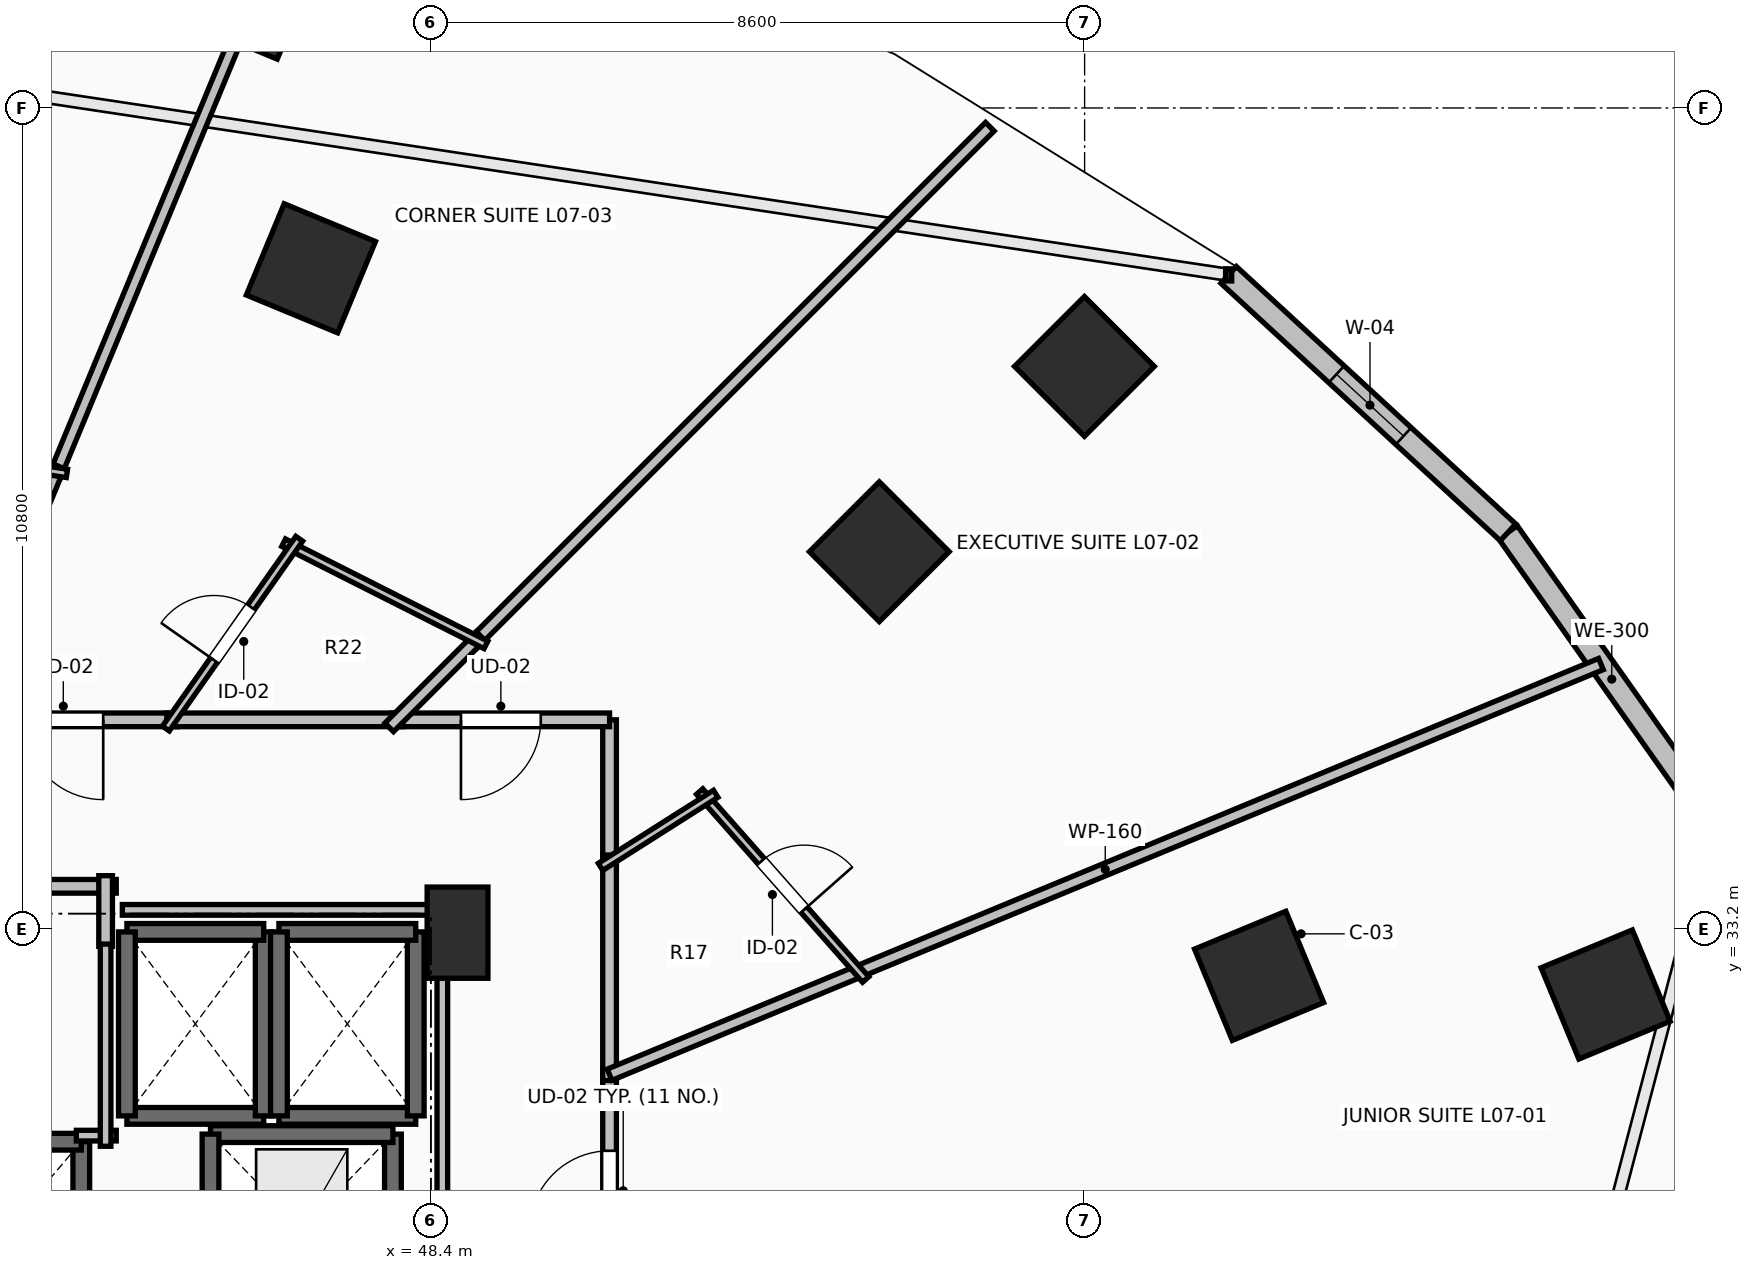
"""IFC4 building model, lengths in metres.
Left out: names, types, materials, properties, quantities, classifications, styles, units other than length and angle.
Written with IfcOpenShell. Run it as: python <this file> out.ifc"""

import sys

from ifc_helpers import new_model, si_unit, direction, frame, frame_2d, origin, origin_2d, place, context, subcontext, project, spatial, rectangle, extrude, element, fill, save


model = new_model("IFC4")
c1 = context("Model", 3, precision=1e-05, world=origin(), true_north=direction((0.0, 1.0)))
c2 = subcontext(c1, "Body", "Model", "MODEL_VIEW")
j1 = project(units=[si_unit("LENGTHUNIT", "METRE"), si_unit("PLANEANGLEUNIT", "RADIAN")], contexts=[c1])
p1 = place(None, origin())
s1 = spatial("IfcSite", under=j1, at=p1, CompositionType="ELEMENT")
p2 = place(p1, origin())
s2 = spatial("IfcBuilding", under=s1, at=p2, CompositionType="ELEMENT")
p3 = place(p2, frame((0.0, 0.0, 31.0)))
s3 = spatial("IfcBuildingStorey", under=s2, at=p3, CompositionType="ELEMENT", Elevation=31.0)
for number, where, z_axis, x_axis in (
    (1, (59.295, 32.582, 0.0), (0.0, 0.0, 1.0), (0.924, 0.383, 0.0)),
    (2, (54.299, 38.162, 0.0), (0.0, 0.0, 1.0), (0.707, 0.707, 0.0)),
    (3, (46.821, 41.891, 0.0), (0.0, 0.0, 1.0), (0.383, 0.924, 0.0)),
    (4, (63.854, 32.337, 0.0), (0.0, 0.0, 1.0), (0.924, 0.383, 0.0)),
    (5, (56.997, 40.6, 0.0), (0.0, 0.0, 1.0), (0.707, 0.707, 0.0)),
    (6, (46.026, 45.492, 0.0), (0.0, 0.0, 1.0), (0.383, 0.924, 0.0)),
):
    element("IfcColumn", number, at=place(p3, frame(where, z_axis=z_axis, x_axis=x_axis)), inside=s3, PredefinedType="COLUMN", context=c2, shape_type="SweptSolid", body=[
        extrude(rectangle(XDim=1.3, YDim=1.3, at=origin_2d()), origin(), (0.0, 0.0, 1.0), 3.5),
    ])
p4 = place(p3, frame((48.75, 33.15, 0.0), z_axis=(0.0, 0.0, 1.0), x_axis=(1.0, 0.0, 0.0)))
e7 = element("IfcColumn", 7, at=p4, inside=s3, PredefinedType="PILASTER", context=c2, shape_type="SweptSolid", body=[
    extrude(rectangle(XDim=0.8, YDim=1.2, at=origin_2d()), origin(), (0.0, 0.0, 1.0), 3.5),
])
p5 = place(p3, frame((65.301, 34.553, 0.0), z_axis=(0.0, 0.0, 1.0), x_axis=(-0.577130815624, 0.816651713803, 0.0)))
e8 = element("IfcWall", 8, at=p5, inside=s3, PredefinedType="STANDARD", context=c2, shape_type="SweptSolid", body=[
    extrude(rectangle(XDim=4.731, YDim=0.3, at=frame_2d((2.366, 0.0))), origin(), (0.0, 0.0, 1.0), 3.24),
])
p6 = place(p3, frame((62.57, 38.417, 0.0), z_axis=(0.0, 0.0, 1.0), x_axis=(-0.735342629635, 0.677695519419, 0.0)))
e9 = element("IfcWall", 9, at=p6, inside=s3, PredefinedType="STANDARD", context=c2, shape_type="SweptSolid", body=[
    extrude(rectangle(XDim=4.997, YDim=0.3, at=frame_2d((2.499, 0.0))), origin(), (0.0, 0.0, 1.0), 3.24),
])
p7 = place(p6, frame((1.869, 0.0, 0.85)))
e10 = element("IfcOpeningElement", 10, at=p7, cuts=e9, PredefinedType="OPENING", context=c2, shape_type="SweptSolid", body=[
    extrude(rectangle(XDim=1.2, YDim=1.95, at=frame_2d((0.6, 0.975))), frame((0.0, 0.165, 0.0), z_axis=(0.0, -1.0, 0.0), x_axis=(1.0, 0.0, 0.0)), (0.0, 0.0, 1.0), 0.33),
])
p8 = place(p3, frame((43.8, 27.8, 0.0), z_axis=(0.0, 0.0, 1.0), x_axis=(0.0, 1.0, 0.0)))
e11 = element("IfcWall", 11, at=p8, inside=s3, PredefinedType="SOLIDWALL", context=c2, shape_type="SweptSolid", body=[
    extrude(rectangle(XDim=2.6, YDim=0.22, at=frame_2d((1.3, 0.0))), origin(), (0.0, 0.0, 1.0), 3.24),
])
p9 = place(p3, frame((43.8, 30.4, 0.0), z_axis=(0.0, 0.0, 1.0), x_axis=(-1.0, 0.0, 0.0)))
e12 = element("IfcWall", 12, at=p9, inside=s3, PredefinedType="SOLIDWALL", context=c2, shape_type="SweptSolid", body=[
    extrude(rectangle(XDim=2.2, YDim=0.22, at=frame_2d((1.1, 0.0))), origin(), (0.0, 0.0, 1.0), 3.24),
])
p10 = place(p3, frame((44.4, 30.74, 0.0), z_axis=(0.0, 0.0, 1.0), x_axis=(1.0, 0.0, 0.0)))
e13 = element("IfcWall", 13, at=p10, inside=s3, PredefinedType="SOLIDWALL", context=c2, shape_type="SweptSolid", body=[
    extrude(rectangle(XDim=1.8, YDim=0.22, at=frame_2d((0.9, 0.0))), origin(), (0.0, 0.0, 1.0), 3.24),
])
p11 = place(p3, frame((46.2, 30.74, 0.0), z_axis=(0.0, 0.0, 1.0), x_axis=(0.0, 1.0, 0.0)))
e14 = element("IfcWall", 14, at=p11, inside=s3, PredefinedType="SOLIDWALL", context=c2, shape_type="SweptSolid", body=[
    extrude(rectangle(XDim=2.42, YDim=0.22, at=frame_2d((1.21, 0.0))), origin(), (0.0, 0.0, 1.0), 3.24),
])
p12 = place(p3, frame((46.2, 33.16, 0.0), z_axis=(0.0, 0.0, 1.0), x_axis=(-1.0, 0.0, 0.0)))
e15 = element("IfcWall", 15, at=p12, inside=s3, PredefinedType="SOLIDWALL", context=c2, shape_type="SweptSolid", body=[
    extrude(rectangle(XDim=1.8, YDim=0.22, at=frame_2d((0.9, 0.0))), origin(), (0.0, 0.0, 1.0), 3.24),
])
p13 = place(p3, frame((44.4, 33.16, 0.0), z_axis=(0.0, 0.0, 1.0), x_axis=(0.0, -1.0, 0.0)))
e16 = element("IfcWall", 16, at=p13, inside=s3, PredefinedType="SOLIDWALL", context=c2, shape_type="SweptSolid", body=[
    extrude(rectangle(XDim=2.42, YDim=0.22, at=frame_2d((1.21, 0.0))), origin(), (0.0, 0.0, 1.0), 3.24),
])
p14 = place(p3, frame((46.4, 30.74, 0.0), z_axis=(0.0, 0.0, 1.0), x_axis=(1.0, 0.0, 0.0)))
e17 = element("IfcWall", 17, at=p14, inside=s3, PredefinedType="SOLIDWALL", context=c2, shape_type="SweptSolid", body=[
    extrude(rectangle(XDim=1.8, YDim=0.22, at=frame_2d((0.9, 0.0))), origin(), (0.0, 0.0, 1.0), 3.24),
])
p15 = place(p3, frame((48.2, 30.74, 0.0), z_axis=(0.0, 0.0, 1.0), x_axis=(0.0, 1.0, 0.0)))
e18 = element("IfcWall", 18, at=p15, inside=s3, PredefinedType="SOLIDWALL", context=c2, shape_type="SweptSolid", body=[
    extrude(rectangle(XDim=2.42, YDim=0.22, at=frame_2d((1.21, 0.0))), origin(), (0.0, 0.0, 1.0), 3.24),
])
p16 = place(p3, frame((48.2, 33.16, 0.0), z_axis=(0.0, 0.0, 1.0), x_axis=(-1.0, 0.0, 0.0)))
e19 = element("IfcWall", 19, at=p16, inside=s3, PredefinedType="SOLIDWALL", context=c2, shape_type="SweptSolid", body=[
    extrude(rectangle(XDim=1.8, YDim=0.22, at=frame_2d((0.9, 0.0))), origin(), (0.0, 0.0, 1.0), 3.24),
])
p17 = place(p3, frame((46.4, 33.16, 0.0), z_axis=(0.0, 0.0, 1.0), x_axis=(0.0, -1.0, 0.0)))
e20 = element("IfcWall", 20, at=p17, inside=s3, PredefinedType="SOLIDWALL", context=c2, shape_type="SweptSolid", body=[
    extrude(rectangle(XDim=2.42, YDim=0.22, at=frame_2d((1.21, 0.0))), origin(), (0.0, 0.0, 1.0), 3.24),
])
p18 = place(p3, frame((47.9, 28.0, 0.0), z_axis=(0.0, 0.0, 1.0), x_axis=(0.0, 1.0, 0.0)))
e21 = element("IfcWall", 21, at=p18, inside=s3, PredefinedType="SHEAR", context=c2, shape_type="SweptSolid", body=[
    extrude(rectangle(XDim=2.5, YDim=0.22, at=frame_2d((1.25, 0.0))), origin(), (0.0, 0.0, 1.0), 3.24),
])
p19 = place(p3, frame((47.9, 30.5, 0.0), z_axis=(0.0, 0.0, 1.0), x_axis=(-1.0, 0.0, 0.0)))
e22 = element("IfcWall", 22, at=p19, inside=s3, PredefinedType="SHEAR", context=c2, shape_type="SweptSolid", body=[
    extrude(rectangle(XDim=2.4, YDim=0.22, at=frame_2d((1.2, 0.0))), origin(), (0.0, 0.0, 1.0), 3.24),
])
p20 = place(p3, frame((45.5, 30.5, 0.0), z_axis=(0.0, 0.0, 1.0), x_axis=(0.0, -1.0, 0.0)))
e23 = element("IfcWall", 23, at=p20, inside=s3, PredefinedType="SHEAR", context=c2, shape_type="SweptSolid", body=[
    extrude(rectangle(XDim=2.5, YDim=0.22, at=frame_2d((1.25, 0.0))), origin(), (0.0, 0.0, 1.0), 3.24),
])
p21 = place(p3, frame((44.26, 33.76, 0.0), z_axis=(0.0, 0.0, 1.0), x_axis=(-1.0, 0.0, 0.0)))
e24 = element("IfcWall", 24, at=p21, inside=s3, PredefinedType="PARTITIONING", context=c2, shape_type="SweptSolid", body=[
    extrude(rectangle(XDim=3.36, YDim=0.18, at=frame_2d((1.68, 0.0))), origin(), (0.0, 0.0, 1.0), 3.24),
])
p22 = place(p21, frame((1.255, 0.0, 0.0)))
e25 = element("IfcOpeningElement", 25, at=p22, cuts=e24, PredefinedType="OPENING", context=c2, shape_type="SweptSolid", body=[
    extrude(rectangle(XDim=0.85, YDim=2.1, at=frame_2d((0.425, 1.05))), frame((0.0, 0.105, 0.0), z_axis=(0.0, -1.0, 0.0), x_axis=(1.0, 0.0, 0.0)), (0.0, 0.0, 1.0), 0.21),
])
p23 = place(p3, frame((44.12, 32.97, 0.0), z_axis=(0.0, 0.0, 1.0), x_axis=(0.0, 1.0, 0.0)))
e26 = element("IfcWall", 26, at=p23, inside=s3, PredefinedType="PARTITIONING", context=c2, shape_type="SweptSolid", body=[
    extrude(rectangle(XDim=0.93, YDim=0.18, at=frame_2d((0.465, 0.0))), origin(), (0.0, 0.0, 1.0), 3.24),
])
p24 = place(p3, frame((50.75, 28.165, 0.0), z_axis=(0.0, 0.0, 1.0), x_axis=(0.0, 1.0, 0.0)))
e27 = element("IfcWall", 27, at=p24, inside=s3, PredefinedType="PARTITIONING", context=c2, shape_type="SweptSolid", body=[
    extrude(rectangle(XDim=3.181, YDim=0.18, at=frame_2d((1.59, 0.0))), origin(), (0.0, 0.0, 1.0), 3.24),
])
p25 = place(p24, frame((1.065, 0.0, 0.0)))
e28 = element("IfcOpeningElement", 28, at=p25, cuts=e27, PredefinedType="OPENING", context=c2, shape_type="SweptSolid", body=[
    extrude(rectangle(XDim=1.05, YDim=2.2, at=frame_2d((0.525, 1.1))), frame((0.0, 0.105, 0.0), z_axis=(0.0, -1.0, 0.0), x_axis=(1.0, 0.0, 0.0)), (0.0, 0.0, 1.0), 0.21),
])
p26 = place(p3, frame((50.75, 34.031, 0.0), z_axis=(0.0, 0.0, 1.0), x_axis=(0.0, 1.0, 0.0)))
e29 = element("IfcWall", 29, at=p26, inside=s3, PredefinedType="PARTITIONING", context=c2, shape_type="SweptSolid", body=[
    extrude(rectangle(XDim=1.919, YDim=0.18, at=frame_2d((0.959, 0.0))), origin(), (0.0, 0.0, 1.0), 2.432),
])
p27 = place(p3, frame((50.75, 35.95, 0.0), z_axis=(0.0, 0.0, 1.0), x_axis=(-1.0, 0.0, 0.0)))
e30 = element("IfcWall", 30, at=p27, inside=s3, PredefinedType="PARTITIONING", context=c2, shape_type="SweptSolid", body=[
    extrude(rectangle(XDim=2.86, YDim=0.18, at=frame_2d((1.43, 0.0))), origin(), (0.0, 0.0, 1.0), 2.432),
])
p28 = place(p27, frame((0.905, 0.0, 0.0)))
e31 = element("IfcOpeningElement", 31, at=p28, cuts=e30, PredefinedType="OPENING", context=c2, shape_type="SweptSolid", body=[
    extrude(rectangle(XDim=1.05, YDim=2.2, at=frame_2d((0.525, 1.1))), frame((0.0, 0.105, 0.0), z_axis=(0.0, -1.0, 0.0), x_axis=(1.0, 0.0, 0.0)), (0.0, 0.0, 1.0), 0.21),
])
p29 = place(p3, frame((50.75, 31.206, 0.0), z_axis=(0.0, 0.0, 1.0), x_axis=(0.0, 1.0, 0.0)))
e32 = element("IfcWall", 32, at=p29, inside=s3, PredefinedType="PARTITIONING", context=c2, shape_type="SweptSolid", body=[
    extrude(rectangle(XDim=2.965, YDim=0.18, at=frame_2d((1.482, 0.0))), origin(), (0.0, 0.0, 1.0), 2.432),
])
p30 = place(p3, frame((45.066, 35.95, 0.0), z_axis=(0.0, 0.0, 1.0), x_axis=(-1.0, 0.0, 0.0)))
e33 = element("IfcWall", 33, at=p30, inside=s3, PredefinedType="PARTITIONING", context=c2, shape_type="SweptSolid", body=[
    extrude(rectangle(XDim=3.005, YDim=0.18, at=frame_2d((1.502, 0.0))), origin(), (0.0, 0.0, 1.0), 3.24),
])
p31 = place(p30, frame((0.978, 0.0, 0.0)))
e34 = element("IfcOpeningElement", 34, at=p31, cuts=e33, PredefinedType="OPENING", context=c2, shape_type="SweptSolid", body=[
    extrude(rectangle(XDim=1.05, YDim=2.2, at=frame_2d((0.525, 1.1))), frame((0.0, 0.105, 0.0), z_axis=(0.0, -1.0, 0.0), x_axis=(1.0, 0.0, 0.0)), (0.0, 0.0, 1.0), 0.21),
])
p32 = place(p3, frame((48.03, 35.95, 0.0), z_axis=(0.0, 0.0, 1.0), x_axis=(-1.0, 0.0, 0.0)))
e35 = element("IfcWall", 35, at=p32, inside=s3, PredefinedType="PARTITIONING", context=c2, shape_type="SweptSolid", body=[
    extrude(rectangle(XDim=3.104, YDim=0.18, at=frame_2d((1.552, 0.0))), origin(), (0.0, 0.0, 1.0), 2.432),
])
p33 = place(p3, frame((63.793, 36.684, 0.0), z_axis=(0.0, 0.0, 1.0), x_axis=(-0.923866969846, -0.382713759914, 0.0)))
e36 = element("IfcWall", 36, at=p33, inside=s3, PredefinedType="PARTITIONING", context=c2, shape_type="SweptSolid", body=[
    extrude(rectangle(XDim=14.118, YDim=0.16, at=frame_2d((7.059, 0.0))), origin(), (0.0, 0.0, 1.0), 2.432),
])
p34 = place(p3, frame((51.935, 35.007, 0.0), z_axis=(0.0, 0.0, 1.0), x_axis=(0.662059609276, -0.749451181709, 0.0)))
e37 = element("IfcWall", 37, at=p34, inside=s3, PredefinedType="PARTITIONING", context=c2, shape_type="SweptSolid", body=[
    extrude(rectangle(XDim=3.299, YDim=0.11, at=frame_2d((1.65, 0.0))), origin(), (0.0, 0.0, 1.0), 2.432),
])
p35 = place(p34, frame((1.225, 0.0, 0.0)))
e38 = element("IfcOpeningElement", 38, at=p35, cuts=e37, PredefinedType="OPENING", context=c2, shape_type="SweptSolid", body=[
    extrude(rectangle(XDim=0.85, YDim=2.1, at=frame_2d((0.425, 1.05))), frame((0.0, 0.07, 0.0), z_axis=(0.0, -1.0, 0.0), x_axis=(1.0, 0.0, 0.0)), (0.0, 0.0, 1.0), 0.14),
])
p36 = place(p3, frame((50.632, 34.016, 0.0), z_axis=(0.0, 0.0, 1.0), x_axis=(0.844361394482, 0.535774052665, 0.0)))
e39 = element("IfcWall", 39, at=p36, inside=s3, PredefinedType="PARTITIONING", context=c2, shape_type="SweptSolid", body=[
    extrude(rectangle(XDim=1.793, YDim=0.11, at=frame_2d((0.897, 0.0))), origin(), (0.0, 0.0, 1.0), 2.922),
])
p37 = place(p3, frame((55.753, 43.753, 0.0), z_axis=(0.0, 0.0, 1.0), x_axis=(-0.707106781187, -0.707106781187, 0.0)))
e40 = element("IfcWall", 40, at=p37, inside=s3, PredefinedType="PARTITIONING", context=c2, shape_type="SweptSolid", body=[
    extrude(rectangle(XDim=9.615, YDim=0.16, at=frame_2d((4.808, 0.0))), origin(), (0.0, 0.0, 1.0), 2.624),
])
p38 = place(p3, frame((49.053, 37.053, 0.0), z_axis=(0.0, 0.0, 1.0), x_axis=(-0.707106781187, -0.707106781187, 0.0)))
e41 = element("IfcWall", 41, at=p38, inside=s3, PredefinedType="PARTITIONING", context=c2, shape_type="SweptSolid", body=[
    extrude(rectangle(XDim=1.7, YDim=0.16, at=frame_2d((0.85, 0.0))), origin(), (0.0, 0.0, 1.0), 2.432),
])
p39 = place(p3, frame((46.462, 38.281, 0.0), z_axis=(0.0, 0.0, 1.0), x_axis=(0.892486842203, -0.451073426944, 0.0)))
e42 = element("IfcWall", 42, at=p39, inside=s3, PredefinedType="PARTITIONING", context=c2, shape_type="SweptSolid", body=[
    extrude(rectangle(XDim=2.982, YDim=0.11, at=frame_2d((1.491, 0.0))), origin(), (0.0, 0.0, 1.0), 2.432),
])
p40 = place(p3, frame((44.913, 35.835, 0.0), z_axis=(0.0, 0.0, 1.0), x_axis=(0.574986040322, 0.818163219312, 0.0)))
e43 = element("IfcWall", 43, at=p40, inside=s3, PredefinedType="PARTITIONING", context=c2, shape_type="SweptSolid", body=[
    extrude(rectangle(XDim=3.052, YDim=0.11, at=frame_2d((1.526, 0.0))), origin(), (0.0, 0.0, 1.0), 2.922),
])
p41 = place(p40, frame((1.101, 0.0, 0.0)))
e44 = element("IfcOpeningElement", 44, at=p41, cuts=e43, PredefinedType="OPENING", context=c2, shape_type="SweptSolid", body=[
    extrude(rectangle(XDim=0.85, YDim=2.1, at=frame_2d((0.425, 1.05))), frame((0.0, 0.07, 0.0), z_axis=(0.0, -1.0, 0.0), x_axis=(1.0, 0.0, 0.0)), (0.0, 0.0, 1.0), 0.14),
])
p42 = place(p3, frame((46.792, 47.225, 0.0), z_axis=(0.0, 0.0, 1.0), x_axis=(-0.382750893248, -0.923851586413, 0.0)))
e45 = element("IfcWall", 45, at=p42, inside=s3, PredefinedType="PARTITIONING", context=c2, shape_type="SweptSolid", body=[
    extrude(rectangle(XDim=8.734, YDim=0.16, at=frame_2d((4.367, 0.0))), origin(), (0.0, 0.0, 1.0), 2.874),
])
p43 = place(p3, frame((43.503, 39.285, 0.0), z_axis=(0.0, 0.0, 1.0), x_axis=(-0.382867331148, -0.923803337697, 0.0)))
e46 = element("IfcWall", 46, at=p43, inside=s3, PredefinedType="PARTITIONING", context=c2, shape_type="SweptSolid", body=[
    extrude(rectangle(XDim=3.75, YDim=0.16, at=frame_2d((1.875, 0.0))), origin(), (0.0, 0.0, 1.0), 2.922),
])
p44 = place(p3, frame((40.896, 39.6, 0.0), z_axis=(0.0, 0.0, 1.0), x_axis=(0.98891024541, -0.148514398367, 0.0)))
e47 = element("IfcWall", 47, at=p44, inside=s3, PredefinedType="PARTITIONING", context=c2, shape_type="SweptSolid", body=[
    extrude(rectangle(XDim=2.745, YDim=0.11, at=frame_2d((1.373, 0.0))), origin(), (0.0, 0.0, 1.0), 3.24),
])
p45 = place(p3, frame((43.735, 30.48, 0.0), z_axis=(0.0, 0.0, 1.0), x_axis=(1.0, 0.0, 0.0)))
e48 = element("IfcWall", 48, at=p45, inside=s3, PredefinedType="PARTITIONING", context=c2, shape_type="SweptSolid", body=[
    extrude(rectangle(XDim=0.525, YDim=0.14, at=frame_2d((0.262, 0.0))), origin(), (0.0, 0.0, 1.0), 3.24),
])
p46 = place(p3, frame((44.12, 30.34, 0.0), z_axis=(0.0, 0.0, 1.0), x_axis=(0.0, 1.0, 0.0)))
e49 = element("IfcWall", 49, at=p46, inside=s3, PredefinedType="PARTITIONING", context=c2, shape_type="SweptSolid", body=[
    extrude(rectangle(XDim=2.66, YDim=0.14, at=frame_2d((1.33, 0.0))), origin(), (0.0, 0.0, 1.0), 3.24),
])
p47 = place(p3, frame((44.34, 33.45, 0.0), z_axis=(0.0, 0.0, 1.0), x_axis=(1.0, 0.0, 0.0)))
e50 = element("IfcWall", 50, at=p47, inside=s3, PredefinedType="PARTITIONING", context=c2, shape_type="SweptSolid", body=[
    extrude(rectangle(XDim=4.21, YDim=0.14, at=frame_2d((2.105, 0.0))), origin(), (0.0, 0.0, 1.0), 2.432),
])
p48 = place(p3, frame((48.55, 33.45, 0.0), z_axis=(0.0, 0.0, 1.0), x_axis=(0.0, -1.0, 0.0)))
e51 = element("IfcWall", 51, at=p48, inside=s3, PredefinedType="PARTITIONING", context=c2, shape_type="SweptSolid", body=[
    extrude(rectangle(XDim=5.254, YDim=0.14, at=frame_2d((2.627, 0.0))), origin(), (0.0, 0.0, 1.0), 2.432),
])
p49 = place(p7, origin())
e52 = element("IfcWindow", 52, at=p49, inside=s3, PartitioningType="SINGLE_PANEL", PredefinedType="WINDOW", context=c2, shape_type="SweptSolid", body=[
    extrude(rectangle(XDim=1.2, YDim=1.95, at=frame_2d((0.6, 0.975))), frame((0.0, 0.03, 0.0), z_axis=(0.0, -1.0, 0.0), x_axis=(1.0, 0.0, 0.0)), (0.0, 0.0, 1.0), 0.06),
])
fill(e10, e52)
p50 = place(p25, origin())
e53 = element("IfcDoor", 53, at=p50, inside=s3, OperationType="SINGLE_SWING_LEFT", PredefinedType="DOOR", context=c2, shape_type="SweptSolid", body=[
    extrude(rectangle(XDim=1.05, YDim=2.2, at=frame_2d((0.525, 1.1))), frame((0.0, 0.025, 0.0), z_axis=(0.0, -1.0, 0.0), x_axis=(1.0, 0.0, 0.0)), (0.0, 0.0, 1.0), 0.05),
])
fill(e28, e53)
p51 = place(p28, origin())
e54 = element("IfcDoor", 54, at=p51, inside=s3, OperationType="SINGLE_SWING_RIGHT", PredefinedType="DOOR", context=c2, shape_type="SweptSolid", body=[
    extrude(rectangle(XDim=1.05, YDim=2.2, at=frame_2d((0.525, 1.1))), frame((0.0, 0.025, 0.0), z_axis=(0.0, -1.0, 0.0), x_axis=(1.0, 0.0, 0.0)), (0.0, 0.0, 1.0), 0.05),
])
fill(e31, e54)
p52 = place(p31, origin())
e55 = element("IfcDoor", 55, at=p52, inside=s3, OperationType="SINGLE_SWING_LEFT", PredefinedType="DOOR", context=c2, shape_type="SweptSolid", body=[
    extrude(rectangle(XDim=1.05, YDim=2.2, at=frame_2d((0.525, 1.1))), frame((0.0, 0.025, 0.0), z_axis=(0.0, -1.0, 0.0), x_axis=(1.0, 0.0, 0.0)), (0.0, 0.0, 1.0), 0.05),
])
fill(e34, e55)
p53 = place(p35, origin())
e56 = element("IfcDoor", 56, at=p53, inside=s3, OperationType="SINGLE_SWING_RIGHT", PredefinedType="DOOR", context=c2, shape_type="SweptSolid", body=[
    extrude(rectangle(XDim=0.85, YDim=2.1, at=frame_2d((0.425, 1.05))), frame((0.0, 0.025, 0.0), z_axis=(0.0, -1.0, 0.0), x_axis=(1.0, 0.0, 0.0)), (0.0, 0.0, 1.0), 0.05),
])
fill(e38, e56)
p54 = place(p41, origin())
e57 = element("IfcDoor", 57, at=p54, inside=s3, OperationType="SINGLE_SWING_LEFT", PredefinedType="DOOR", context=c2, shape_type="SweptSolid", body=[
    extrude(rectangle(XDim=0.85, YDim=2.1, at=frame_2d((0.425, 1.05))), frame((0.0, 0.025, 0.0), z_axis=(0.0, -1.0, 0.0), x_axis=(1.0, 0.0, 0.0)), (0.0, 0.0, 1.0), 0.05),
])
fill(e44, e57)
save(model, sys.argv[1])
